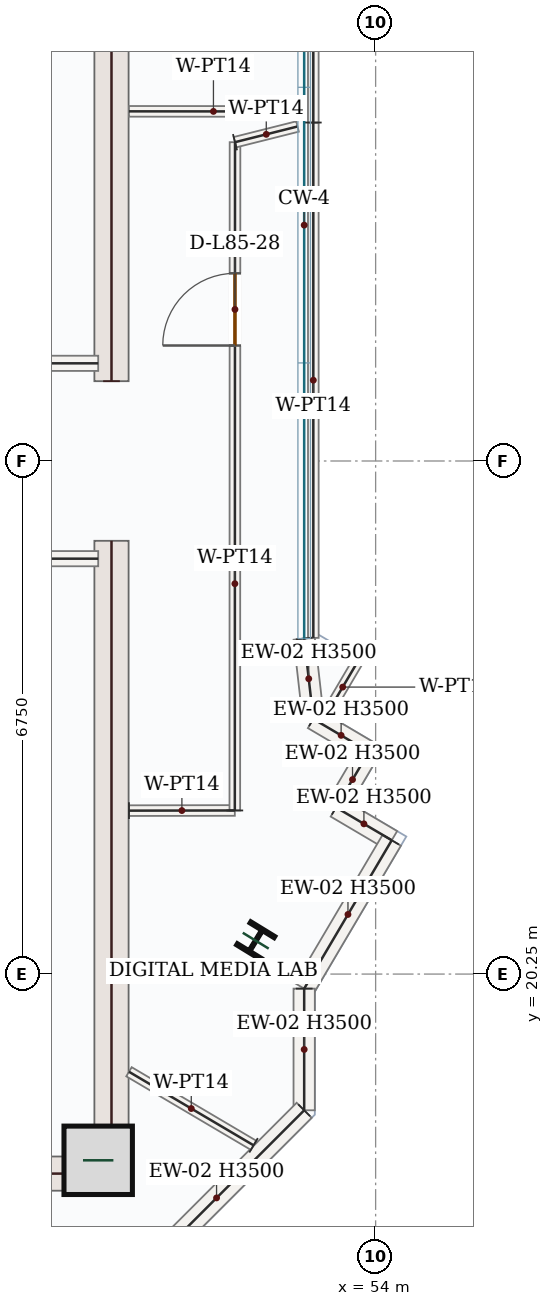
"""IFC4 building model, lengths in metres.
Left out: names, types, materials, properties, quantities, classifications, styles, units other than length and angle.
Written with IfcOpenShell. Run it as: python <this file> out.ifc"""

import sys

from ifc_helpers import new_model, si_unit, direction, frame, frame_2d, origin, origin_2d, place, context, subcontext, project, spatial, rectangle, i_section, extrude, source, transform, mapped, element, fill, save


model = new_model("IFC4")
c1 = context("Model", 3, precision=1e-05, world=origin(), true_north=direction((0.0, 1.0)))
c2 = subcontext(c1, "Body", "Model", "MODEL_VIEW")
j1 = project(units=[si_unit("LENGTHUNIT", "METRE"), si_unit("PLANEANGLEUNIT", "RADIAN")], contexts=[c1])
p1 = place(None, origin())
s1 = spatial("IfcSite", under=j1, at=p1, CompositionType="ELEMENT")
p2 = place(p1, origin())
s2 = spatial("IfcBuilding", under=s1, at=p2, CompositionType="ELEMENT")
p3 = place(p2, frame((0.0, 0.0, 349.8)))
s3 = spatial("IfcBuildingStorey", under=s2, at=p3, CompositionType="ELEMENT", Elevation=349.8)
m1 = source(origin(), c2, "Body", "SweptSolid", [
    extrude(rectangle(XDim=8.55, YDim=0.45, at=frame_2d((4.275, 0.0))), origin(), (0.0, 0.0, 1.0), 3.5),
])
for number, where, z_axis, x_axis in (
    (1, (50.525, 17.4, 0.0), (0.0, 0.0, 1.0), (0.0, 1.0, 0.0)),
    (2, (50.525, 28.05, 0.0), (0.0, 0.0, 1.0), (0.0, 1.0, 0.0)),
):
    element("IfcWall", number, at=place(p3, frame(where, z_axis=z_axis, x_axis=x_axis)), inside=s3, PredefinedType="SHEAR", context=c2, shape_type="MappedRepresentation", body=[
        mapped(m1, transform((0.0, 0.0, 0.0), x_axis=(1.0, 0.0, 0.0), y_axis=(0.0, 1.0, 0.0), z_axis=(0.0, 0.0, 1.0), scale=1.0)),
    ])
m2 = source(origin(), c2, "Body", "SweptSolid", [
    extrude(rectangle(XDim=7.1, YDim=0.45, at=frame_2d((3.55, 0.0))), origin(), (0.0, 0.0, 1.0), 3.5),
])
p4 = place(p3, frame((43.2, 17.625, 0.0), z_axis=(0.0, 0.0, 1.0), x_axis=(1.0, 0.0, 0.0)))
e3 = element("IfcWall", 3, at=p4, inside=s3, PredefinedType="SHEAR", context=c2, shape_type="MappedRepresentation", body=[
    mapped(m2, transform((0.0, 0.0, 0.0), x_axis=(1.0, 0.0, 0.0), y_axis=(0.0, 1.0, 0.0), z_axis=(0.0, 0.0, 1.0), scale=1.0)),
])
m3 = source(origin(), c2, "Body", "SweptSolid", [
    extrude(rectangle(XDim=0.9, YDim=0.9, at=origin_2d()), origin(), (0.0, 0.0, 1.0), 3.75),
])
p5 = place(p3, frame((50.35, 17.8, 0.0), z_axis=(0.0, 0.0, 1.0), x_axis=(1.0, 0.0, 0.0)))
e4 = element("IfcColumn", 4, at=p5, inside=s3, PredefinedType="COLUMN", context=c2, shape_type="MappedRepresentation", body=[
    mapped(m3, transform((0.0, 0.0, 0.0), x_axis=(1.0, 0.0, 0.0), y_axis=(0.0, 1.0, 0.0), z_axis=(0.0, 0.0, 1.0), scale=1.0)),
])
m4 = source(origin(), c2, "Body", "SweptSolid", [
    extrude(i_section(OverallWidth=0.369, OverallDepth=0.356, WebThickness=0.011, FlangeThickness=0.018, FilletRadius=0.018, at=origin_2d()), origin(), (0.0, 0.0, 1.0), 3.75),
])
p6 = place(p3, frame((52.423, 20.689, 0.0), z_axis=(0.0, 0.0, 1.0), x_axis=(-0.852640164354, 0.522498564716, 0.0)))
e5 = element("IfcColumn", 5, at=p6, inside=s3, PredefinedType="COLUMN", context=c2, shape_type="MappedRepresentation", body=[
    mapped(m4, transform((0.0, 0.0, 0.0), x_axis=(1.0, 0.0, 0.0), y_axis=(0.0, 1.0, 0.0), z_axis=(0.0, 0.0, 1.0), scale=1.0)),
])
m5 = source(origin(), c2, "Body", "SweptSolid", [
    extrude(rectangle(XDim=1.065, YDim=0.28, at=frame_2d((0.532, 0.0))), origin(), (0.0, 0.0, 1.0), 3.5),
])
p7 = place(p3, frame((53.06, 24.664, 0.0), z_axis=(0.0, 0.0, 1.0), x_axis=(0.112595815397, -0.993640871923, 0.0)))
e6 = element("IfcWall", 6, at=p7, inside=s3, PredefinedType="SOLIDWALL", context=c2, shape_type="MappedRepresentation", body=[
    mapped(m5, transform((0.0, 0.0, 0.0), x_axis=(1.0, 0.0, 0.0), y_axis=(0.0, 1.0, 0.0), z_axis=(0.0, 0.0, 1.0), scale=1.0)),
])
m6 = source(origin(), c2, "Body", "SweptSolid", [
    extrude(rectangle(XDim=0.85, YDim=0.28, at=frame_2d((0.425, 0.0))), origin(), (0.0, 0.0, 1.0), 3.5),
])
for number, where, z_axis, x_axis in (
    (7, (53.18, 23.606, 0.0), (0.0, 0.0, 1.0), (0.861, -0.508, 0.0)),
    (8, (53.912, 23.175, 0.0), (0.0, 0.0, 1.0), (-0.508, -0.861, 0.0)),
):
    element("IfcWall", number, at=place(p3, frame(where, z_axis=z_axis, x_axis=x_axis)), inside=s3, PredefinedType="SOLIDWALL", context=c2, shape_type="MappedRepresentation", body=[
        mapped(m6, transform((0.0, 0.0, 0.0), x_axis=(1.0, 0.0, 0.0), y_axis=(0.0, 1.0, 0.0), z_axis=(0.0, 0.0, 1.0), scale=1.0)),
    ])
m7 = source(origin(), c2, "Body", "SweptSolid", [
    extrude(rectangle(XDim=0.85, YDim=0.28, at=frame_2d((0.425, 0.0))), origin(), (0.0, 0.0, 1.0), 3.5),
])
p8 = place(p3, frame((53.48, 22.442, 0.0), z_axis=(0.0, 0.0, 1.0), x_axis=(0.861246626019, -0.508187218622, 0.0)))
e9 = element("IfcWall", 9, at=p8, inside=s3, PredefinedType="SOLIDWALL", context=c2, shape_type="MappedRepresentation", body=[
    mapped(m7, transform((0.0, 0.0, 0.0), x_axis=(1.0, 0.0, 0.0), y_axis=(0.0, 1.0, 0.0), z_axis=(0.0, 0.0, 1.0), scale=1.0)),
])
m8 = source(origin(), c2, "Body", "SweptSolid", [
    extrude(rectangle(XDim=2.266, YDim=0.28, at=frame_2d((1.133, 0.0))), origin(), (0.0, 0.0, 1.0), 3.5),
])
p9 = place(p3, frame((54.212, 22.01, 0.0), z_axis=(0.0, 0.0, 1.0), x_axis=(-0.508224770074, -0.861224467304, 0.0)))
e10 = element("IfcWall", 10, at=p9, inside=s3, PredefinedType="SOLIDWALL", context=c2, shape_type="MappedRepresentation", body=[
    mapped(m8, transform((0.0, 0.0, 0.0), x_axis=(1.0, 0.0, 0.0), y_axis=(0.0, 1.0, 0.0), z_axis=(0.0, 0.0, 1.0), scale=1.0)),
])
m9 = source(origin(), c2, "Body", "SweptSolid", [
    extrude(rectangle(XDim=1.601, YDim=0.28, at=frame_2d((0.8, 0.0))), origin(), (0.0, 0.0, 1.0), 3.5),
])
p10 = place(p3, frame((53.06, 20.059, 0.0), z_axis=(0.0, 0.0, 1.0), x_axis=(0.0, -1.0, 0.0)))
e11 = element("IfcWall", 11, at=p10, inside=s3, PredefinedType="SOLIDWALL", context=c2, shape_type="MappedRepresentation", body=[
    mapped(m9, transform((0.0, 0.0, 0.0), x_axis=(1.0, 0.0, 0.0), y_axis=(0.0, 1.0, 0.0), z_axis=(0.0, 0.0, 1.0), scale=1.0)),
])
m10 = source(origin(), c2, "Body", "SweptSolid", [
    extrude(rectangle(XDim=3.261, YDim=0.28, at=frame_2d((1.63, 0.0))), origin(), (0.0, 0.0, 1.0), 3.5),
])
p11 = place(p3, frame((53.06, 18.458, 0.0), z_axis=(0.0, 0.0, 1.0), x_axis=(-0.707106781187, -0.707106781187, 0.0)))
e12 = element("IfcWall", 12, at=p11, inside=s3, PredefinedType="SOLIDWALL", context=c2, shape_type="MappedRepresentation", body=[
    mapped(m10, transform((0.0, 0.0, 0.0), x_axis=(1.0, 0.0, 0.0), y_axis=(0.0, 1.0, 0.0), z_axis=(0.0, 0.0, 1.0), scale=1.0)),
])
m11 = source(origin(), c2, "Body", "SweptSolid", [
    extrude(rectangle(XDim=4.25, YDim=0.2, at=frame_2d((2.125, 0.0))), origin(), (0.0, 0.0, 1.0), 3.5),
])
for number, where, z_axis, x_axis in (
    (13, (46.1, 25.715, 0.0), (0.0, 0.0, 1.0), (1.0, 0.0, 0.0)),
    (14, (46.1, 28.285, 0.0), (0.0, 0.0, 1.0), (1.0, 0.0, 0.0)),
):
    element("IfcWall", number, at=place(p3, frame(where, z_axis=z_axis, x_axis=x_axis)), inside=s3, PredefinedType="SOLIDWALL", context=c2, shape_type="MappedRepresentation", body=[
        mapped(m11, transform((0.0, 0.0, 0.0), x_axis=(1.0, 0.0, 0.0), y_axis=(0.0, 1.0, 0.0), z_axis=(0.0, 0.0, 1.0), scale=1.0)),
    ])
m12 = source(origin(), c2, "Body", "SweptSolid", [
    extrude(rectangle(XDim=1.393, YDim=0.14, at=frame_2d((0.696, 0.0))), origin(), (0.0, 0.0, 1.0), 3.5),
])
p12 = place(p3, frame((50.755, 22.4, 0.0), z_axis=(0.0, 0.0, 1.0), x_axis=(0.999998755213, 0.001577838148, 0.0)))
e15 = element("IfcWall", 15, at=p12, inside=s3, PredefinedType="PARTITIONING", context=c2, shape_type="MappedRepresentation", body=[
    mapped(m12, transform((0.0, 0.0, 0.0), x_axis=(1.0, 0.0, 0.0), y_axis=(0.0, 1.0, 0.0), z_axis=(0.0, 0.0, 1.0), scale=1.0)),
])
p13 = place(p3, frame((52.147, 22.402, 0.0), z_axis=(0.0, 0.0, 1.0), x_axis=(0.000277685205, 0.999999961445, 0.0)))
e16 = element("IfcWall", 16, at=p13, inside=s3, PredefinedType="PARTITIONING", context=c2, shape_type="SweptSolid", body=[
    extrude(rectangle(XDim=8.792, YDim=0.14, at=frame_2d((4.396, 0.0))), origin(), (0.0, 0.0, 1.0), 3.5),
])
p14 = place(p13, frame((6.117, 0.0, 0.0)))
e17 = element("IfcOpeningElement", 17, at=p14, cuts=e16, PredefinedType="OPENING", context=c2, shape_type="SweptSolid", body=[
    extrude(rectangle(XDim=0.95, YDim=2.15, at=frame_2d((0.475, 1.075))), frame((0.0, 0.08, 0.0), z_axis=(0.0, -1.0, 0.0), x_axis=(1.0, 0.0, 0.0)), (0.0, 0.0, 1.0), 0.16),
])
m13 = source(origin(), c2, "Body", "SweptSolid", [
    extrude(rectangle(XDim=0.848, YDim=0.14, at=frame_2d((0.424, 0.0))), origin(), (0.0, 0.0, 1.0), 3.5),
])
p15 = place(p3, frame((52.15, 31.194, 0.0), z_axis=(0.0, 0.0, 1.0), x_axis=(0.969955921728, 0.243280722428, 0.0)))
e18 = element("IfcWall", 18, at=p15, inside=s3, PredefinedType="PARTITIONING", context=c2, shape_type="MappedRepresentation", body=[
    mapped(m13, transform((0.0, 0.0, 0.0), x_axis=(1.0, 0.0, 0.0), y_axis=(0.0, 1.0, 0.0), z_axis=(0.0, 0.0, 1.0), scale=1.0)),
])
m14 = source(origin(), c2, "Body", "SweptSolid", [
    extrude(rectangle(XDim=6.78, YDim=0.14, at=frame_2d((3.39, 0.0))), origin(), (0.0, 0.0, 1.0), 3.5),
])
p16 = place(p3, frame((53.18, 31.453, 0.0), z_axis=(0.0, 0.0, 1.0), x_axis=(7.2022759e-05, -0.999999997406, 0.0)))
e19 = element("IfcWall", 19, at=p16, inside=s3, PredefinedType="PARTITIONING", context=c2, shape_type="MappedRepresentation", body=[
    mapped(m14, transform((0.0, 0.0, 0.0), x_axis=(1.0, 0.0, 0.0), y_axis=(0.0, 1.0, 0.0), z_axis=(0.0, 0.0, 1.0), scale=1.0)),
])
m15 = source(origin(), c2, "Body", "SweptSolid", [
    extrude(rectangle(XDim=0.825, YDim=0.14, at=frame_2d((0.413, 0.0))), origin(), (0.0, 0.0, 1.0), 3.5),
])
p17 = place(p3, frame((53.776, 24.381, 0.0), z_axis=(0.0, 0.0, 1.0), x_axis=(-0.507472658058, -0.861667860213, 0.0)))
e20 = element("IfcWall", 20, at=p17, inside=s3, PredefinedType="PARTITIONING", context=c2, shape_type="MappedRepresentation", body=[
    mapped(m15, transform((0.0, 0.0, 0.0), x_axis=(1.0, 0.0, 0.0), y_axis=(0.0, 1.0, 0.0), z_axis=(0.0, 0.0, 1.0), scale=1.0)),
])
m16 = source(origin(), c2, "Body", "SweptSolid", [
    extrude(rectangle(XDim=1.904, YDim=0.14, at=frame_2d((0.952, 0.0))), origin(), (0.0, 0.0, 1.0), 3.5),
])
p18 = place(p3, frame((52.394, 17.997, 0.0), z_axis=(0.0, 0.0, 1.0), x_axis=(-0.86120470185, 0.508258262611, 0.0)))
e21 = element("IfcWall", 21, at=p18, inside=s3, PredefinedType="PARTITIONING", context=c2, shape_type="MappedRepresentation", body=[
    mapped(m16, transform((0.0, 0.0, 0.0), x_axis=(1.0, 0.0, 0.0), y_axis=(0.0, 1.0, 0.0), z_axis=(0.0, 0.0, 1.0), scale=1.0)),
])
m17 = source(origin(), c2, "Body", "SweptSolid", [
    extrude(rectangle(XDim=2.223, YDim=0.14, at=frame_2d((1.111, 0.0))), origin(), (0.0, 0.0, 1.0), 3.5),
])
p19 = place(p3, frame((52.978, 31.598, 0.0), z_axis=(0.0, 0.0, 1.0), x_axis=(-0.999999704402, 0.000768892567, 0.0)))
e22 = element("IfcWall", 22, at=p19, inside=s3, PredefinedType="PARTITIONING", context=c2, shape_type="MappedRepresentation", body=[
    mapped(m17, transform((0.0, 0.0, 0.0), x_axis=(1.0, 0.0, 0.0), y_axis=(0.0, 1.0, 0.0), z_axis=(0.0, 0.0, 1.0), scale=1.0)),
])
m18 = source(origin(), c2, "Body", "SweptSolid", [
    extrude(rectangle(XDim=4.139, YDim=0.14, at=frame_2d((2.07, 0.0))), origin(), (0.0, 0.0, 1.0), 3.5),
])
p20 = place(p3, frame((53.18, 35.592, 0.0), z_axis=(0.0, 0.0, 1.0), x_axis=(0.0, -1.0, 0.0)))
e23 = element("IfcWall", 23, at=p20, inside=s3, PredefinedType="PARTITIONING", context=c2, shape_type="MappedRepresentation", body=[
    mapped(m18, transform((0.0, 0.0, 0.0), x_axis=(1.0, 0.0, 0.0), y_axis=(0.0, 1.0, 0.0), z_axis=(0.0, 0.0, 1.0), scale=1.0)),
])
m19 = source(origin(), c2, "Body", "SweptSolid", [
    extrude(rectangle(XDim=0.95, YDim=2.15, at=frame_2d((0.475, 1.075))), frame((0.0, 0.025, 0.0), z_axis=(0.0, -1.0, 0.0), x_axis=(1.0, 0.0, 0.0)), (0.0, 0.0, 1.0), 0.05),
])
p21 = place(p14, origin())
e24 = element("IfcDoor", 24, at=p21, inside=s3, OperationType="SINGLE_SWING_LEFT", PredefinedType="DOOR", context=c2, shape_type="MappedRepresentation", body=[
    mapped(m19, transform((0.0, 0.0, 0.0), x_axis=(1.0, 0.0, 0.0), y_axis=(0.0, 1.0, 0.0), z_axis=(0.0, 0.0, 1.0), scale=1.0)),
])
fill(e17, e24)
save(model, sys.argv[1])
